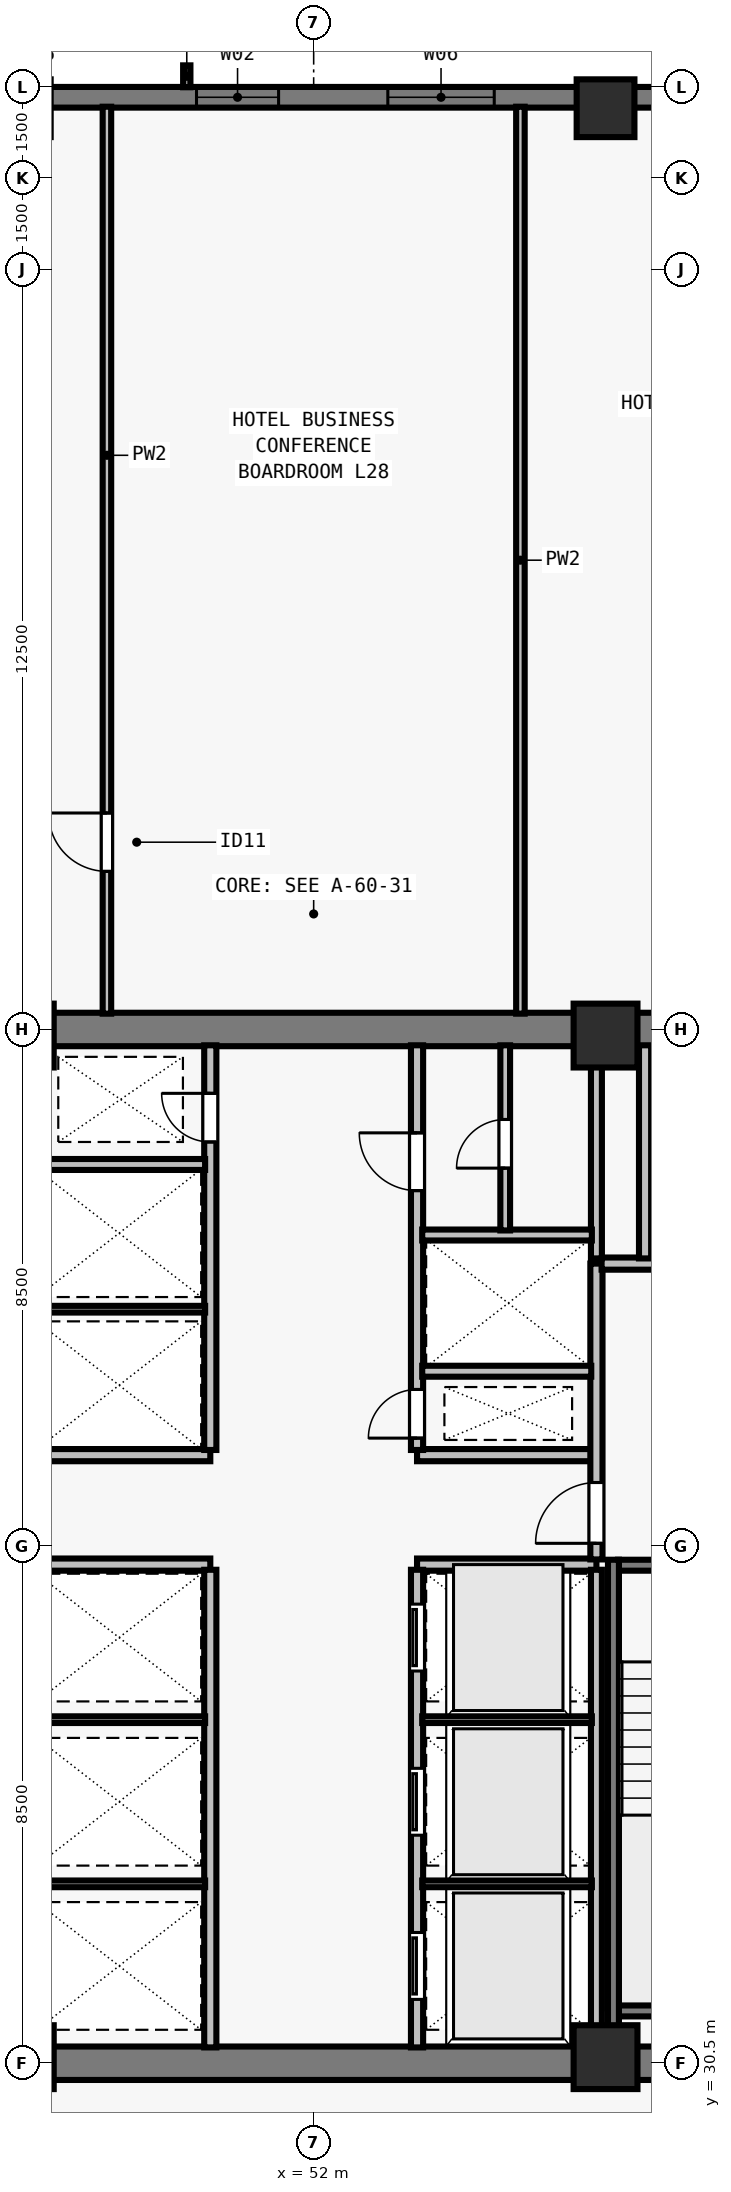
"""IFC4 building model, lengths in metres.
Left out: names, types, materials, properties, quantities, classifications, styles, units other than length and angle.
Written with IfcOpenShell. Run it as: python <this file> out.ifc"""

import sys

from ifc_helpers import new_model, si_unit, direction, frame, frame_2d, origin, origin_2d, place, context, subcontext, project, spatial, rectangle, extrude, element, fill, save


model = new_model("IFC4")
c1 = context("Model", 3, precision=1e-05, world=origin(), true_north=direction((0.0, 1.0)))
c2 = subcontext(c1, "Body", "Model", "MODEL_VIEW")
j1 = project(units=[si_unit("LENGTHUNIT", "METRE"), si_unit("PLANEANGLEUNIT", "RADIAN")], contexts=[c1])
p1 = place(None, origin())
s1 = spatial("IfcSite", under=j1, at=p1, CompositionType="ELEMENT")
p2 = place(p1, origin())
s2 = spatial("IfcBuilding", under=s1, at=p2, CompositionType="ELEMENT")
p3 = place(p2, frame((0.0, 0.0, 106.0)))
s3 = spatial("IfcBuildingStorey", under=s2, at=p3, CompositionType="ELEMENT", Elevation=106.0)
for number, where, z_axis, x_axis in (
    (1, (47.2, 30.6, 0.0), (0.0, 0.0, 1.0), (1.0, 0.0, 0.0)),
    (2, (56.8, 30.6, 0.0), (0.0, 0.0, 1.0), (1.0, 0.0, 0.0)),
    (3, (47.2, 47.4, 0.0), (0.0, 0.0, 1.0), (1.0, 0.0, 0.0)),
    (4, (56.8, 47.4, 0.0), (0.0, 0.0, 1.0), (1.0, 0.0, 0.0)),
):
    element("IfcColumn", number, at=place(p3, frame(where, z_axis=z_axis, x_axis=x_axis)), inside=s3, PredefinedType="COLUMN", context=c2, shape_type="SweptSolid", body=[
        extrude(rectangle(XDim=1.05, YDim=1.05, at=origin_2d()), origin(), (0.0, 0.0, 1.0), 3.5),
    ])
p4 = place(p3, frame((56.8, 62.65, 0.0), z_axis=(0.0, 0.0, 1.0), x_axis=(1.0, 0.0, 0.0)))
e5 = element("IfcColumn", 5, at=p4, inside=s3, PredefinedType="COLUMN", context=c2, shape_type="SweptSolid", body=[
    extrude(rectangle(XDim=0.95, YDim=0.95, at=origin_2d()), origin(), (0.0, 0.0, 1.0), 3.5),
])
p5 = place(p3, frame((45.0, 62.83, 0.0), z_axis=(0.0, 0.0, 1.0), x_axis=(1.0, 0.0, 0.0)))
e6 = element("IfcWall", 6, at=p5, inside=s3, PredefinedType="SOLIDWALL", context=c2, shape_type="SweptSolid", body=[
    extrude(rectangle(XDim=26.682, YDim=0.34, at=frame_2d((13.341, 0.0))), origin(), (0.0, 0.0, 1.0), 3.28),
])
p6 = place(p5, frame((5.073, 0.0, 0.8)))
e7 = element("IfcOpeningElement", 7, at=p6, cuts=e6, PredefinedType="OPENING", context=c2, shape_type="SweptSolid", body=[
    extrude(rectangle(XDim=1.35, YDim=1.66, at=frame_2d((0.675, 0.83))), frame((0.0, 0.18, 0.0), z_axis=(0.0, -1.0, 0.0), x_axis=(1.0, 0.0, 0.0)), (0.0, 0.0, 1.0), 0.36),
])
p7 = place(p5, frame((8.219, 0.0, 0.8)))
e8 = element("IfcOpeningElement", 8, at=p7, cuts=e6, PredefinedType="OPENING", context=c2, shape_type="SweptSolid", body=[
    extrude(rectangle(XDim=1.75, YDim=1.66, at=frame_2d((0.875, 0.83))), frame((0.0, 0.18, 0.0), z_axis=(0.0, -1.0, 0.0), x_axis=(1.0, 0.0, 0.0)), (0.0, 0.0, 1.0), 0.36),
])
p8 = place(p5, frame((12.666, 0.0, 0.8)))
e9 = element("IfcOpeningElement", 9, at=p8, cuts=e6, PredefinedType="OPENING", context=c2, shape_type="SweptSolid", body=[
    extrude(rectangle(XDim=1.35, YDim=1.66, at=frame_2d((0.675, 0.83))), frame((0.0, 0.18, 0.0), z_axis=(0.0, -1.0, 0.0), x_axis=(1.0, 0.0, 0.0)), (0.0, 0.0, 1.0), 0.36),
])
p9 = place(p5, frame((15.812, 0.0, 0.8)))
e10 = element("IfcOpeningElement", 10, at=p9, cuts=e6, PredefinedType="OPENING", context=c2, shape_type="SweptSolid", body=[
    extrude(rectangle(XDim=1.75, YDim=1.66, at=frame_2d((0.875, 0.83))), frame((0.0, 0.18, 0.0), z_axis=(0.0, -1.0, 0.0), x_axis=(1.0, 0.0, 0.0)), (0.0, 0.0, 1.0), 0.36),
])
p10 = place(p5, frame((20.709, 0.0, 0.8)))
e11 = element("IfcOpeningElement", 11, at=p10, cuts=e6, PredefinedType="OPENING", context=c2, shape_type="SweptSolid", body=[
    extrude(rectangle(XDim=1.35, YDim=1.66, at=frame_2d((0.675, 0.83))), frame((0.0, 0.18, 0.0), z_axis=(0.0, -1.0, 0.0), x_axis=(1.0, 0.0, 0.0)), (0.0, 0.0, 1.0), 0.36),
])
for number, where, z_axis, x_axis in (
    (12, (43.225, 30.5, 0.0), (0.0, 0.0, 1.0), (1.0, 0.0, 0.0)),
    (13, (43.225, 47.5, 0.0), (0.0, 0.0, 1.0), (1.0, 0.0, 0.0)),
):
    element("IfcWall", number, at=place(p3, frame(where, z_axis=z_axis, x_axis=x_axis)), inside=s3, PredefinedType="SHEAR", context=c2, shape_type="SweptSolid", body=[
        extrude(rectangle(XDim=17.55, YDim=0.55, at=frame_2d((8.775, 0.0))), origin(), (0.0, 0.0, 1.0), 3.28),
    ])
for number, where, z_axis, x_axis in (
    (14, (47.35, 38.7, 0.0), (0.0, 0.0, 1.0), (1.0, 0.0, 0.0)),
    (15, (47.35, 40.5, 0.0), (0.0, 0.0, 1.0), (1.0, 0.0, 0.0)),
    (16, (53.7, 38.7, 0.0), (0.0, 0.0, 1.0), (1.0, 0.0, 0.0)),
    (17, (53.7, 40.5, 0.0), (0.0, 0.0, 1.0), (1.0, 0.0, 0.0)),
):
    element("IfcWall", number, at=place(p3, frame(where, z_axis=z_axis, x_axis=x_axis)), inside=s3, PredefinedType="SOLIDWALL", context=c2, shape_type="SweptSolid", body=[
        extrude(rectangle(XDim=2.95, YDim=0.2, at=frame_2d((1.475, 0.0))), origin(), (0.0, 0.0, 1.0), 3.28),
    ])
p11 = place(p3, frame((50.3, 30.76, 0.0), z_axis=(0.0, 0.0, 1.0), x_axis=(0.0, 1.0, 0.0)))
e18 = element("IfcWall", 18, at=p11, inside=s3, PredefinedType="SOLIDWALL", context=c2, shape_type="SweptSolid", body=[
    extrude(rectangle(XDim=7.855, YDim=0.2, at=frame_2d((3.927, 0.0))), origin(), (0.0, 0.0, 1.0), 3.28),
])
p12 = place(p3, frame((53.7, 30.76, 0.0), z_axis=(0.0, 0.0, 1.0), x_axis=(0.0, 1.0, 0.0)))
e19 = element("IfcWall", 19, at=p12, inside=s3, PredefinedType="SOLIDWALL", context=c2, shape_type="SweptSolid", body=[
    extrude(rectangle(XDim=7.855, YDim=0.2, at=frame_2d((3.927, 0.0))), origin(), (0.0, 0.0, 1.0), 3.28),
])
p13 = place(p12, frame((0.79, 0.0, 0.0)))
e20 = element("IfcOpeningElement", 20, at=p13, cuts=e19, PredefinedType="OPENING", context=c2, shape_type="SweptSolid", body=[
    extrude(rectangle(XDim=1.1, YDim=2.2, at=frame_2d((0.55, 1.1))), frame((0.0, 0.11, 0.0), z_axis=(0.0, -1.0, 0.0), x_axis=(1.0, 0.0, 0.0)), (0.0, 0.0, 1.0), 0.22),
])
p14 = place(p12, frame((3.49, 0.0, 0.0)))
e21 = element("IfcOpeningElement", 21, at=p14, cuts=e19, PredefinedType="OPENING", context=c2, shape_type="SweptSolid", body=[
    extrude(rectangle(XDim=1.1, YDim=2.2, at=frame_2d((0.55, 1.1))), frame((0.0, 0.11, 0.0), z_axis=(0.0, -1.0, 0.0), x_axis=(1.0, 0.0, 0.0)), (0.0, 0.0, 1.0), 0.22),
])
p15 = place(p12, frame((6.19, 0.0, 0.0)))
e22 = element("IfcOpeningElement", 22, at=p15, cuts=e19, PredefinedType="OPENING", context=c2, shape_type="SweptSolid", body=[
    extrude(rectangle(XDim=1.1, YDim=2.2, at=frame_2d((0.55, 1.1))), frame((0.0, 0.11, 0.0), z_axis=(0.0, -1.0, 0.0), x_axis=(1.0, 0.0, 0.0)), (0.0, 0.0, 1.0), 0.22),
])
p16 = place(p3, frame((50.3, 40.585, 0.0), z_axis=(0.0, 0.0, 1.0), x_axis=(0.0, 1.0, 0.0)))
e23 = element("IfcWall", 23, at=p16, inside=s3, PredefinedType="SOLIDWALL", context=c2, shape_type="SweptSolid", body=[
    extrude(rectangle(XDim=6.655, YDim=0.2, at=frame_2d((3.328, 0.0))), origin(), (0.0, 0.0, 1.0), 3.28),
])
p17 = place(p16, frame((5.065, 0.0, 0.0)))
e24 = element("IfcOpeningElement", 24, at=p17, cuts=e23, PredefinedType="OPENING", context=c2, shape_type="SweptSolid", body=[
    extrude(rectangle(XDim=0.8, YDim=2.08, at=frame_2d((0.4, 1.04))), frame((0.0, 0.11, 0.0), z_axis=(0.0, -1.0, 0.0), x_axis=(1.0, 0.0, 0.0)), (0.0, 0.0, 1.0), 0.22),
])
p18 = place(p3, frame((53.7, 40.585, 0.0), z_axis=(0.0, 0.0, 1.0), x_axis=(0.0, 1.0, 0.0)))
e25 = element("IfcWall", 25, at=p18, inside=s3, PredefinedType="SOLIDWALL", context=c2, shape_type="SweptSolid", body=[
    extrude(rectangle(XDim=6.655, YDim=0.2, at=frame_2d((3.328, 0.0))), origin(), (0.0, 0.0, 1.0), 3.28),
])
p19 = place(p18, frame((0.195, 0.0, 0.0)))
e26 = element("IfcOpeningElement", 26, at=p19, cuts=e25, PredefinedType="OPENING", context=c2, shape_type="SweptSolid", body=[
    extrude(rectangle(XDim=0.8, YDim=2.08, at=frame_2d((0.4, 1.04))), frame((0.0, 0.11, 0.0), z_axis=(0.0, -1.0, 0.0), x_axis=(1.0, 0.0, 0.0)), (0.0, 0.0, 1.0), 0.22),
])
p20 = place(p18, frame((4.265, 0.0, 0.0)))
e27 = element("IfcOpeningElement", 27, at=p20, cuts=e25, PredefinedType="OPENING", context=c2, shape_type="SweptSolid", body=[
    extrude(rectangle(XDim=0.95, YDim=2.12, at=frame_2d((0.475, 1.06))), frame((0.0, 0.11, 0.0), z_axis=(0.0, -1.0, 0.0), x_axis=(1.0, 0.0, 0.0)), (0.0, 0.0, 1.0), 0.22),
])
p21 = place(p3, frame((56.65, 38.785, 0.0), z_axis=(0.0, 0.0, 1.0), x_axis=(0.0, 1.0, 0.0)))
e28 = element("IfcWall", 28, at=p21, inside=s3, PredefinedType="SOLIDWALL", context=c2, shape_type="SweptSolid", body=[
    extrude(rectangle(XDim=4.865, YDim=0.2, at=frame_2d((2.433, 0.0))), origin(), (0.0, 0.0, 1.0), 3.28),
])
p22 = place(p21, frame((0.265, 0.0, 0.0)))
e29 = element("IfcOpeningElement", 29, at=p22, cuts=e28, PredefinedType="OPENING", context=c2, shape_type="SweptSolid", body=[
    extrude(rectangle(XDim=1.0, YDim=2.15, at=frame_2d((0.5, 1.075))), frame((0.0, 0.11, 0.0), z_axis=(0.0, -1.0, 0.0), x_axis=(1.0, 0.0, 0.0)), (0.0, 0.0, 1.0), 0.22),
])
p23 = place(p3, frame((56.735, 43.65, 0.0), z_axis=(0.0, 0.0, 1.0), x_axis=(1.0, 0.0, 0.0)))
e30 = element("IfcWall", 30, at=p23, inside=s3, PredefinedType="SOLIDWALL", context=c2, shape_type="SweptSolid", body=[
    extrude(rectangle(XDim=3.505, YDim=0.2, at=frame_2d((1.752, 0.0))), origin(), (0.0, 0.0, 1.0), 3.28),
])
p24 = place(p23, frame((1.295, 0.0, 0.0)))
e31 = element("IfcOpeningElement", 31, at=p24, cuts=e30, PredefinedType="OPENING", context=c2, shape_type="SweptSolid", body=[
    extrude(rectangle(XDim=1.1, YDim=2.2, at=frame_2d((0.55, 1.1))), frame((0.0, 0.11, 0.0), z_axis=(0.0, -1.0, 0.0), x_axis=(1.0, 0.0, 0.0)), (0.0, 0.0, 1.0), 0.22),
])
p25 = place(p3, frame((57.45, 43.735, 0.0), z_axis=(0.0, 0.0, 1.0), x_axis=(0.0, 1.0, 0.0)))
e32 = element("IfcWall", 32, at=p25, inside=s3, PredefinedType="SOLIDWALL", context=c2, shape_type="SweptSolid", body=[
    extrude(rectangle(XDim=3.505, YDim=0.2, at=frame_2d((1.752, 0.0))), origin(), (0.0, 0.0, 1.0), 3.28),
])
for number, where, z_axis, x_axis in (
    (33, (47.425, 33.45, 0.0), (0.0, 0.0, 1.0), (1.0, 0.0, 0.0)),
    (34, (47.425, 36.15, 0.0), (0.0, 0.0, 1.0), (1.0, 0.0, 0.0)),
):
    element("IfcWall", number, at=place(p3, frame(where, z_axis=z_axis, x_axis=x_axis)), inside=s3, PredefinedType="PARTITIONING", context=c2, shape_type="SweptSolid", body=[
        extrude(rectangle(XDim=2.79, YDim=0.11, at=frame_2d((1.395, 0.0))), origin(), (0.0, 0.0, 1.0), 3.28),
    ])
p26 = place(p3, frame((56.65, 30.76, 0.0), z_axis=(0.0, 0.0, 1.0), x_axis=(0.0, 1.0, 0.0)))
e35 = element("IfcWall", 35, at=p26, inside=s3, PredefinedType="SOLIDWALL", context=c2, shape_type="SweptSolid", body=[
    extrude(rectangle(XDim=7.855, YDim=0.18, at=frame_2d((3.927, 0.0))), origin(), (0.0, 0.0, 1.0), 3.28),
])
for number, where, z_axis, x_axis in (
    (36, (53.785, 33.45, 0.0), (0.0, 0.0, 1.0), (1.0, 0.0, 0.0)),
    (37, (53.785, 36.15, 0.0), (0.0, 0.0, 1.0), (1.0, 0.0, 0.0)),
):
    element("IfcWall", number, at=place(p3, frame(where, z_axis=z_axis, x_axis=x_axis)), inside=s3, PredefinedType="PARTITIONING", context=c2, shape_type="SweptSolid", body=[
        extrude(rectangle(XDim=2.79, YDim=0.11, at=frame_2d((1.395, 0.0))), origin(), (0.0, 0.0, 1.0), 3.28),
    ])
p27 = place(p3, frame((47.435, 42.9, 0.0), z_axis=(0.0, 0.0, 1.0), x_axis=(1.0, 0.0, 0.0)))
e38 = element("IfcWall", 38, at=p27, inside=s3, PredefinedType="PARTITIONING", context=c2, shape_type="SweptSolid", body=[
    extrude(rectangle(XDim=2.78, YDim=0.11, at=frame_2d((1.39, 0.0))), origin(), (0.0, 0.0, 1.0), 3.28),
])
p28 = place(p3, frame((47.425, 45.28, 0.0), z_axis=(0.0, 0.0, 1.0), x_axis=(1.0, 0.0, 0.0)))
e39 = element("IfcWall", 39, at=p28, inside=s3, PredefinedType="SOLIDWALL", context=c2, shape_type="SweptSolid", body=[
    extrude(rectangle(XDim=2.79, YDim=0.18, at=frame_2d((1.395, 0.0))), origin(), (0.0, 0.0, 1.0), 3.28),
])
p29 = place(p3, frame((56.65, 43.735, 0.0), z_axis=(0.0, 0.0, 1.0), x_axis=(0.0, 1.0, 0.0)))
e40 = element("IfcWall", 40, at=p29, inside=s3, PredefinedType="SOLIDWALL", context=c2, shape_type="SweptSolid", body=[
    extrude(rectangle(XDim=3.505, YDim=0.18, at=frame_2d((1.752, 0.0))), origin(), (0.0, 0.0, 1.0), 3.28),
])
p30 = place(p3, frame((53.785, 41.88, 0.0), z_axis=(0.0, 0.0, 1.0), x_axis=(1.0, 0.0, 0.0)))
e41 = element("IfcWall", 41, at=p30, inside=s3, PredefinedType="SOLIDWALL", context=c2, shape_type="SweptSolid", body=[
    extrude(rectangle(XDim=2.78, YDim=0.18, at=frame_2d((1.39, 0.0))), origin(), (0.0, 0.0, 1.0), 3.28),
])
p31 = place(p3, frame((53.785, 44.12, 0.0), z_axis=(0.0, 0.0, 1.0), x_axis=(1.0, 0.0, 0.0)))
e42 = element("IfcWall", 42, at=p31, inside=s3, PredefinedType="SOLIDWALL", context=c2, shape_type="SweptSolid", body=[
    extrude(rectangle(XDim=2.79, YDim=0.18, at=frame_2d((1.395, 0.0))), origin(), (0.0, 0.0, 1.0), 3.28),
])
p32 = place(p3, frame((55.15, 44.195, 0.0), z_axis=(0.0, 0.0, 1.0), x_axis=(0.0, 1.0, 0.0)))
e43 = element("IfcWall", 43, at=p32, inside=s3, PredefinedType="PARTITIONING", context=c2, shape_type="SweptSolid", body=[
    extrude(rectangle(XDim=3.045, YDim=0.16, at=frame_2d((1.522, 0.0))), origin(), (0.0, 0.0, 1.0), 3.28),
])
p33 = place(p32, frame((1.025, 0.0, 0.0)))
e44 = element("IfcOpeningElement", 44, at=p33, cuts=e43, PredefinedType="OPENING", context=c2, shape_type="SweptSolid", body=[
    extrude(rectangle(XDim=0.8, YDim=2.1, at=frame_2d((0.4, 1.05))), frame((0.0, 0.09, 0.0), z_axis=(0.0, -1.0, 0.0), x_axis=(1.0, 0.0, 0.0)), (0.0, 0.0, 1.0), 0.18),
])
p34 = place(p3, frame((48.6, 47.76, 0.0), z_axis=(0.0, 0.0, 1.0), x_axis=(0.0, 1.0, 0.0)))
e45 = element("IfcWall", 45, at=p34, inside=s3, PredefinedType="PARTITIONING", context=c2, shape_type="SweptSolid", body=[
    extrude(rectangle(XDim=14.915, YDim=0.14, at=frame_2d((7.458, 0.0))), origin(), (0.0, 0.0, 1.0), 2.896),
])
p35 = place(p34, frame((2.34, 0.0, 0.0)))
e46 = element("IfcOpeningElement", 46, at=p35, cuts=e45, PredefinedType="OPENING", context=c2, shape_type="SweptSolid", body=[
    extrude(rectangle(XDim=0.96, YDim=2.12, at=frame_2d((0.48, 1.06))), frame((0.0, 0.08, 0.0), z_axis=(0.0, -1.0, 0.0), x_axis=(1.0, 0.0, 0.0)), (0.0, 0.0, 1.0), 0.16),
])
p36 = place(p3, frame((55.4, 47.76, 0.0), z_axis=(0.0, 0.0, 1.0), x_axis=(0.0, 1.0, 0.0)))
e47 = element("IfcWall", 47, at=p36, inside=s3, PredefinedType="PARTITIONING", context=c2, shape_type="SweptSolid", body=[
    extrude(rectangle(XDim=14.915, YDim=0.14, at=frame_2d((7.458, 0.0))), origin(), (0.0, 0.0, 1.0), 2.896),
])
p37 = place(p3, frame((57.005, 38.69, 0.0), z_axis=(0.0, 0.0, 1.0), x_axis=(1.0, 0.0, 0.0)))
e48 = element("IfcWall", 48, at=p37, inside=s3, PredefinedType="SOLIDWALL", context=c2, shape_type="SweptSolid", body=[
    extrude(rectangle(XDim=3.23, YDim=0.18, at=frame_2d((1.615, 0.0))), origin(), (0.0, 0.0, 1.0), 3.28),
])
p38 = place(p37, frame((1.14, 0.0, 0.0)))
e49 = element("IfcOpeningElement", 49, at=p38, cuts=e48, PredefinedType="OPENING", context=c2, shape_type="SweptSolid", body=[
    extrude(rectangle(XDim=0.95, YDim=2.15, at=frame_2d((0.475, 1.075))), frame((0.0, 0.1, 0.0), z_axis=(0.0, -1.0, 0.0), x_axis=(1.0, 0.0, 0.0)), (0.0, 0.0, 1.0), 0.2),
])
p39 = place(p3, frame((57.005, 31.36, 0.0), z_axis=(0.0, 0.0, 1.0), x_axis=(1.0, 0.0, 0.0)))
e50 = element("IfcWall", 50, at=p39, inside=s3, PredefinedType="SOLIDWALL", context=c2, shape_type="SweptSolid", body=[
    extrude(rectangle(XDim=3.23, YDim=0.18, at=frame_2d((1.615, 0.0))), origin(), (0.0, 0.0, 1.0), 3.28),
])
p40 = place(p3, frame((56.93, 38.78, 0.0), z_axis=(0.0, 0.0, 1.0), x_axis=(0.0, -1.0, 0.0)))
e51 = element("IfcWall", 51, at=p40, inside=s3, PredefinedType="SOLIDWALL", context=c2, shape_type="SweptSolid", body=[
    extrude(rectangle(XDim=8.017, YDim=0.18, at=frame_2d((4.009, 0.0))), origin(), (0.0, 0.0, 1.0), 3.28),
])
p41 = place(p6, origin())
e52 = element("IfcWindow", 52, at=p41, inside=s3, PartitioningType="SINGLE_PANEL", PredefinedType="WINDOW", context=c2, shape_type="SweptSolid", body=[
    extrude(rectangle(XDim=1.35, YDim=1.66, at=frame_2d((0.675, 0.83))), frame((0.0, -0.05, 0.0), z_axis=(0.0, -1.0, 0.0), x_axis=(1.0, 0.0, 0.0)), (0.0, 0.0, 1.0), 0.06),
])
fill(e7, e52)
p42 = place(p7, origin())
e53 = element("IfcWindow", 53, at=p42, inside=s3, PartitioningType="SINGLE_PANEL", PredefinedType="WINDOW", context=c2, shape_type="SweptSolid", body=[
    extrude(rectangle(XDim=1.75, YDim=1.66, at=frame_2d((0.875, 0.83))), frame((0.0, -0.05, 0.0), z_axis=(0.0, -1.0, 0.0), x_axis=(1.0, 0.0, 0.0)), (0.0, 0.0, 1.0), 0.06),
])
fill(e8, e53)
p43 = place(p22, origin())
e54 = element("IfcDoor", 54, at=p43, inside=s3, OperationType="SINGLE_SWING_LEFT", PredefinedType="DOOR", context=c2, shape_type="SweptSolid", body=[
    extrude(rectangle(XDim=1.0, YDim=2.15, at=frame_2d((0.5, 1.075))), frame((0.0, 0.025, 0.0), z_axis=(0.0, -1.0, 0.0), x_axis=(1.0, 0.0, 0.0)), (0.0, 0.0, 1.0), 0.05),
])
fill(e29, e54)
p44 = place(p13, origin())
e55 = element("IfcDoor", 55, at=p44, inside=s3, OperationType="SLIDING_TO_LEFT", PredefinedType="DOOR", context=c2, shape_type="SweptSolid", body=[
    extrude(rectangle(XDim=1.1, YDim=2.2, at=frame_2d((0.55, 1.1))), frame((0.0, 0.025, 0.0), z_axis=(0.0, -1.0, 0.0), x_axis=(1.0, 0.0, 0.0)), (0.0, 0.0, 1.0), 0.05),
])
fill(e20, e55)
p45 = place(p14, origin())
e56 = element("IfcDoor", 56, at=p45, inside=s3, OperationType="SLIDING_TO_LEFT", PredefinedType="DOOR", context=c2, shape_type="SweptSolid", body=[
    extrude(rectangle(XDim=1.1, YDim=2.2, at=frame_2d((0.55, 1.1))), frame((0.0, 0.025, 0.0), z_axis=(0.0, -1.0, 0.0), x_axis=(1.0, 0.0, 0.0)), (0.0, 0.0, 1.0), 0.05),
])
fill(e21, e56)
p46 = place(p15, origin())
e57 = element("IfcDoor", 57, at=p46, inside=s3, OperationType="SLIDING_TO_LEFT", PredefinedType="DOOR", context=c2, shape_type="SweptSolid", body=[
    extrude(rectangle(XDim=1.1, YDim=2.2, at=frame_2d((0.55, 1.1))), frame((0.0, 0.025, 0.0), z_axis=(0.0, -1.0, 0.0), x_axis=(1.0, 0.0, 0.0)), (0.0, 0.0, 1.0), 0.05),
])
fill(e22, e57)
p47 = place(p17, origin())
e58 = element("IfcDoor", 58, at=p47, inside=s3, OperationType="SINGLE_SWING_RIGHT", PredefinedType="DOOR", context=c2, shape_type="SweptSolid", body=[
    extrude(rectangle(XDim=0.8, YDim=2.08, at=frame_2d((0.4, 1.04))), frame((0.0, 0.025, 0.0), z_axis=(0.0, -1.0, 0.0), x_axis=(1.0, 0.0, 0.0)), (0.0, 0.0, 1.0), 0.05),
])
fill(e24, e58)
p48 = place(p19, origin())
e59 = element("IfcDoor", 59, at=p48, inside=s3, OperationType="SINGLE_SWING_LEFT", PredefinedType="DOOR", context=c2, shape_type="SweptSolid", body=[
    extrude(rectangle(XDim=0.8, YDim=2.08, at=frame_2d((0.4, 1.04))), frame((0.0, 0.025, 0.0), z_axis=(0.0, -1.0, 0.0), x_axis=(1.0, 0.0, 0.0)), (0.0, 0.0, 1.0), 0.05),
])
fill(e26, e59)
p49 = place(p20, origin())
e60 = element("IfcDoor", 60, at=p49, inside=s3, OperationType="SINGLE_SWING_RIGHT", PredefinedType="DOOR", context=c2, shape_type="SweptSolid", body=[
    extrude(rectangle(XDim=0.95, YDim=2.12, at=frame_2d((0.475, 1.06))), frame((0.0, 0.025, 0.0), z_axis=(0.0, -1.0, 0.0), x_axis=(1.0, 0.0, 0.0)), (0.0, 0.0, 1.0), 0.05),
])
fill(e27, e60)
p50 = place(p33, origin())
e61 = element("IfcDoor", 61, at=p50, inside=s3, OperationType="SINGLE_SWING_LEFT", PredefinedType="DOOR", context=c2, shape_type="SweptSolid", body=[
    extrude(rectangle(XDim=0.8, YDim=2.1, at=frame_2d((0.4, 1.05))), frame((0.0, 0.025, 0.0), z_axis=(0.0, -1.0, 0.0), x_axis=(1.0, 0.0, 0.0)), (0.0, 0.0, 1.0), 0.05),
])
fill(e44, e61)
p51 = place(p35, origin())
e62 = element("IfcDoor", 62, at=p51, inside=s3, OperationType="SINGLE_SWING_RIGHT", PredefinedType="DOOR", context=c2, shape_type="SweptSolid", body=[
    extrude(rectangle(XDim=0.96, YDim=2.12, at=frame_2d((0.48, 1.06))), frame((0.0, 0.025, 0.0), z_axis=(0.0, -1.0, 0.0), x_axis=(1.0, 0.0, 0.0)), (0.0, 0.0, 1.0), 0.05),
])
fill(e46, e62)
save(model, sys.argv[1])
